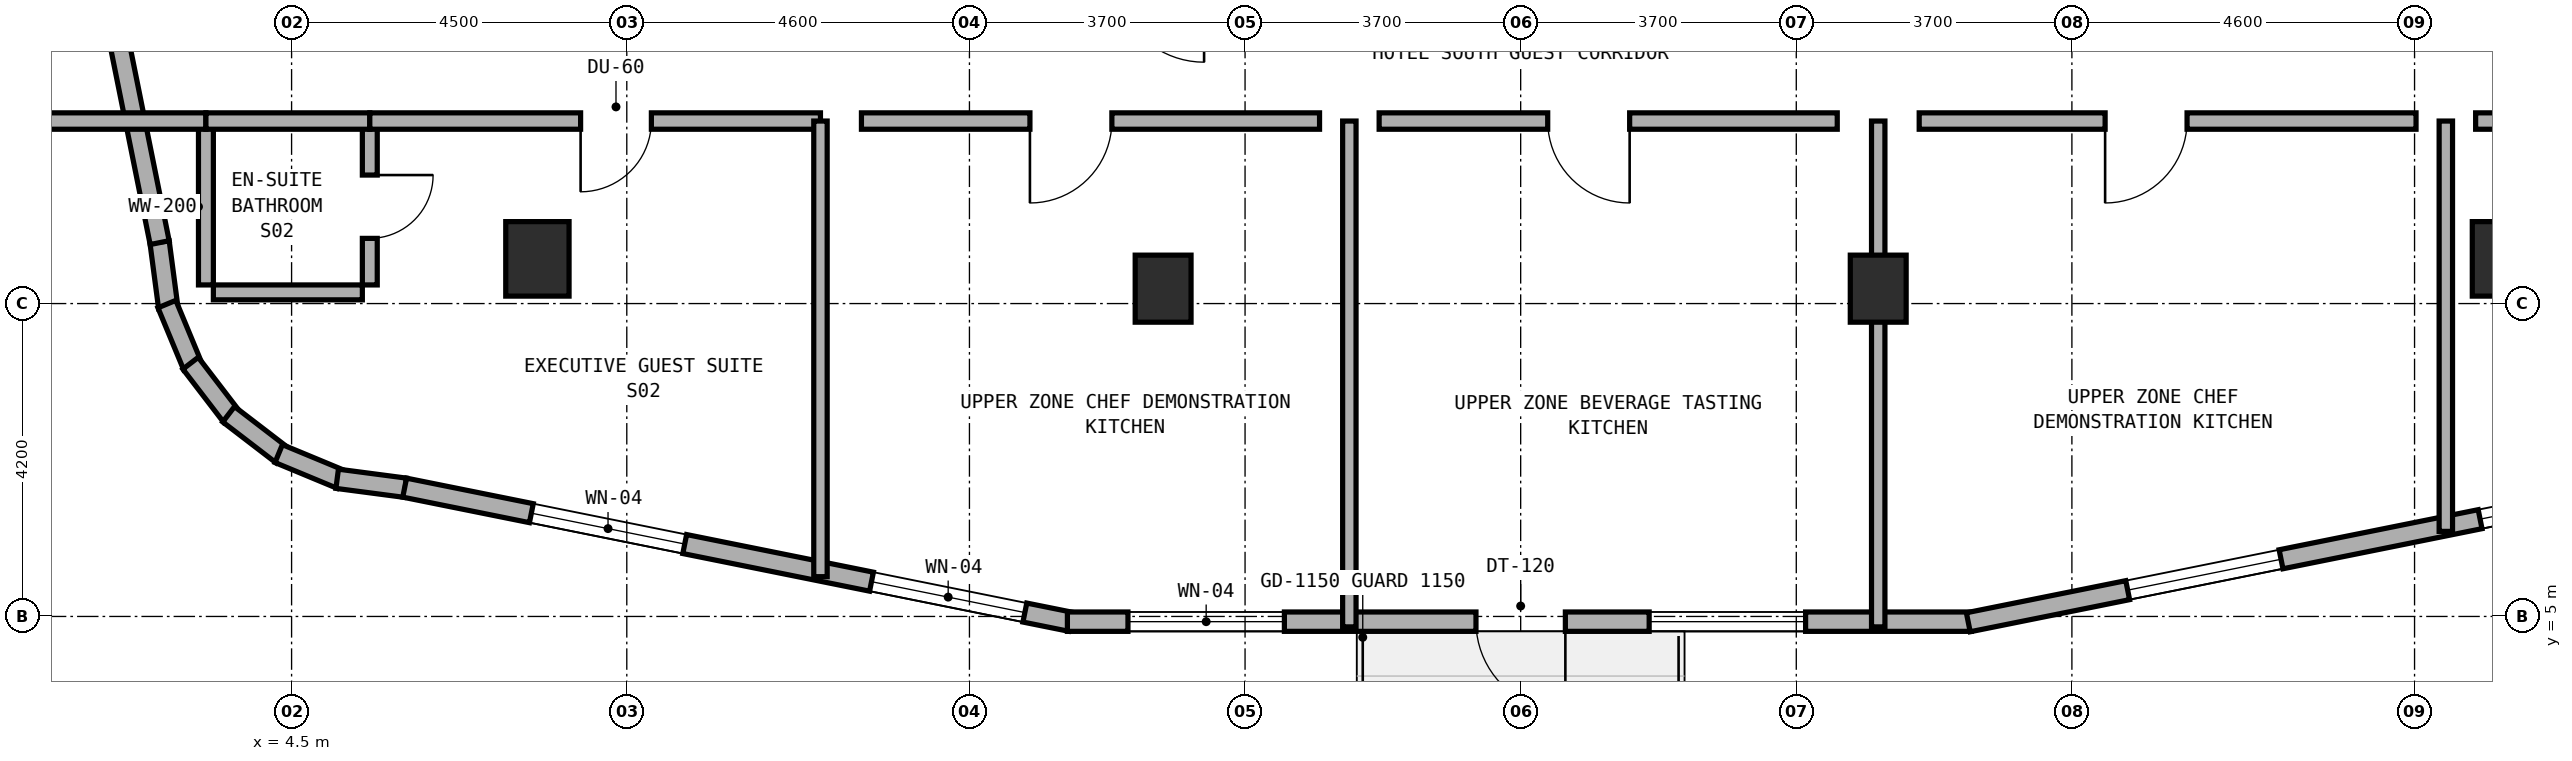
"""IFC4 building model, lengths in metres.
Left out: names, types, materials, properties, quantities, classifications, styles, units other than length and angle.
Written with IfcOpenShell. Run it as: python <this file> out.ifc"""

import sys

from ifc_helpers import new_model, si_unit, direction, frame, frame_2d, origin, origin_2d, place, context, subcontext, project, spatial, rectangle, extrude, element, fill, save


model = new_model("IFC4")
c1 = context("Model", 3, precision=1e-05, world=origin(), true_north=direction((0.0, 1.0)))
c2 = subcontext(c1, "Body", "Model", "MODEL_VIEW")
j1 = project(units=[si_unit("LENGTHUNIT", "METRE"), si_unit("PLANEANGLEUNIT", "RADIAN")], contexts=[c1])
p1 = place(None, origin())
s1 = spatial("IfcSite", under=j1, at=p1, CompositionType="ELEMENT")
p2 = place(p1, origin())
s2 = spatial("IfcBuilding", under=s1, at=p2, CompositionType="ELEMENT")
p3 = place(p2, frame((0.0, 0.0, 166.0)))
s3 = spatial("IfcBuildingStorey", under=s2, at=p3, CompositionType="ELEMENT", Elevation=166.0)
for number, where, z_axis, x_axis in (
    (1, (16.2, 9.4, 0.0), (0.0, 0.0, 1.0), (1.0, 0.0, 0.0)),
    (2, (25.8, 9.4, 0.0), (0.0, 0.0, 1.0), (1.0, 0.0, 0.0)),
):
    element("IfcColumn", number, at=place(p3, frame(where, z_axis=z_axis, x_axis=x_axis)), inside=s3, PredefinedType="COLUMN", context=c2, shape_type="SweptSolid", body=[
        extrude(rectangle(XDim=0.75, YDim=0.9, at=origin_2d()), origin(), (0.0, 0.0, 1.0), 3.5),
    ])
for number, where, z_axis, x_axis in (
    (3, (7.8, 9.8, 0.0), (0.0, 0.0, 1.0), (1.0, 0.0, 0.0)),
    (4, (34.2, 9.8, 0.0), (0.0, 0.0, 1.0), (1.0, 0.0, 0.0)),
):
    element("IfcColumn", number, at=place(p3, frame(where, z_axis=z_axis, x_axis=x_axis)), inside=s3, PredefinedType="COLUMN", context=c2, shape_type="SweptSolid", body=[
        extrude(rectangle(XDim=0.85, YDim=1.0, at=origin_2d()), origin(), (0.0, 0.0, 1.0), 3.5),
    ])
p4 = place(p3, frame((2.728, 10.025, 0.0), z_axis=(0.0, 0.0, 1.0), x_axis=(0.130953706898, -0.991388484223, 0.0)))
e5 = element("IfcWall", 5, at=p4, inside=s3, PredefinedType="STANDARD", context=c2, shape_type="SweptSolid", body=[
    extrude(rectangle(XDim=0.885, YDim=0.26, at=frame_2d((0.443, 0.0))), origin(), (0.0, 0.0, 1.0), 3.22),
])
p5 = place(p3, frame((2.826, 9.193, 0.0), z_axis=(0.0, 0.0, 1.0), x_axis=(0.383290660547, -0.923627776508, 0.0)))
e6 = element("IfcWall", 6, at=p5, inside=s3, PredefinedType="STANDARD", context=c2, shape_type="SweptSolid", body=[
    extrude(rectangle(XDim=0.903, YDim=0.26, at=frame_2d((0.452, 0.0))), origin(), (0.0, 0.0, 1.0), 3.22),
])
p6 = place(p3, frame((3.144, 8.399, 0.0), z_axis=(0.0, 0.0, 1.0), x_axis=(0.608624690463, -0.793458244748, 0.0)))
e7 = element("IfcWall", 7, at=p6, inside=s3, PredefinedType="STANDARD", context=c2, shape_type="SweptSolid", body=[
    extrude(rectangle(XDim=0.902, YDim=0.26, at=frame_2d((0.451, 0.0))), origin(), (0.0, 0.0, 1.0), 3.22),
])
p7 = place(p3, frame((3.655, 7.714, 0.0), z_axis=(0.0, 0.0, 1.0), x_axis=(0.793558456666, -0.608494022858, 0.0)))
e8 = element("IfcWall", 8, at=p7, inside=s3, PredefinedType="STANDARD", context=c2, shape_type="SweptSolid", body=[
    extrude(rectangle(XDim=0.902, YDim=0.26, at=frame_2d((0.451, 0.0))), origin(), (0.0, 0.0, 1.0), 3.22),
])
p8 = place(p3, frame((4.327, 7.186, 0.0), z_axis=(0.0, 0.0, 1.0), x_axis=(0.923683767999, -0.383155708213, 0.0)))
e9 = element("IfcWall", 9, at=p8, inside=s3, PredefinedType="STANDARD", context=c2, shape_type="SweptSolid", body=[
    extrude(rectangle(XDim=0.903, YDim=0.26, at=frame_2d((0.451, 0.0))), origin(), (0.0, 0.0, 1.0), 3.22),
])
p9 = place(p3, frame((5.112, 6.848, 0.0), z_axis=(0.0, 0.0, 1.0), x_axis=(0.991487658083, -0.130200706103, 0.0)))
e10 = element("IfcWall", 10, at=p9, inside=s3, PredefinedType="STANDARD", context=c2, shape_type="SweptSolid", body=[
    extrude(rectangle(XDim=0.921, YDim=0.26, at=frame_2d((0.46, 0.0))), origin(), (0.0, 0.0, 1.0), 3.22),
])
p10 = place(p3, frame((6.018, 6.729, 0.0), z_axis=(0.0, 0.0, 1.0), x_axis=(0.980317172899, -0.197429077186, 0.0)))
e11 = element("IfcWall", 11, at=p10, inside=s3, PredefinedType="STANDARD", context=c2, shape_type="SweptSolid", body=[
    extrude(rectangle(XDim=9.117, YDim=0.26, at=frame_2d((4.559, 0.0))), origin(), (0.0, 0.0, 1.0), 3.22),
])
p11 = place(p10, frame((1.735, 0.0, 0.85)))
e12 = element("IfcOpeningElement", 12, at=p11, cuts=e11, PredefinedType="OPENING", context=c2, shape_type="SweptSolid", body=[
    extrude(rectangle(XDim=2.1, YDim=1.5, at=frame_2d((1.05, 0.75))), frame((0.0, 0.14, 0.0), z_axis=(0.0, -1.0, 0.0), x_axis=(1.0, 0.0, 0.0)), (0.0, 0.0, 1.0), 0.28),
])
p12 = place(p10, frame((6.393, 0.0, 0.85)))
e13 = element("IfcOpeningElement", 13, at=p12, cuts=e11, PredefinedType="OPENING", context=c2, shape_type="SweptSolid", body=[
    extrude(rectangle(XDim=2.1, YDim=1.5, at=frame_2d((1.05, 0.75))), frame((0.0, 0.14, 0.0), z_axis=(0.0, -1.0, 0.0), x_axis=(1.0, 0.0, 0.0)), (0.0, 0.0, 1.0), 0.28),
])
p13 = place(p3, frame((14.915, 4.93, 0.0), z_axis=(0.0, 0.0, 1.0), x_axis=(1.0, 0.0, 0.0)))
e14 = element("IfcWall", 14, at=p13, inside=s3, PredefinedType="STANDARD", context=c2, shape_type="SweptSolid", body=[
    extrude(rectangle(XDim=12.135, YDim=0.26, at=frame_2d((6.067, 0.0))), origin(), (0.0, 0.0, 1.0), 3.22),
])
p14 = place(p13, frame((5.485, 0.0, 0.0)))
e15 = element("IfcOpeningElement", 15, at=p14, cuts=e14, PredefinedType="OPENING", context=c2, shape_type="SweptSolid", body=[
    extrude(rectangle(XDim=1.2, YDim=2.15, at=frame_2d((0.6, 1.075))), frame((0.0, 0.14, 0.0), z_axis=(0.0, -1.0, 0.0), x_axis=(1.0, 0.0, 0.0)), (0.0, 0.0, 1.0), 0.28),
])
p15 = place(p13, frame((0.813, 0.0, 0.85)))
e16 = element("IfcOpeningElement", 16, at=p15, cuts=e14, PredefinedType="OPENING", context=c2, shape_type="SweptSolid", body=[
    extrude(rectangle(XDim=2.1, YDim=1.5, at=frame_2d((1.05, 0.75))), frame((0.0, 0.14, 0.0), z_axis=(0.0, -1.0, 0.0), x_axis=(1.0, 0.0, 0.0)), (0.0, 0.0, 1.0), 0.28),
])
p16 = place(p13, frame((7.81, 0.0, 0.85)))
e17 = element("IfcOpeningElement", 17, at=p16, cuts=e14, PredefinedType="OPENING", context=c2, shape_type="SweptSolid", body=[
    extrude(rectangle(XDim=2.1, YDim=1.5, at=frame_2d((1.05, 0.75))), frame((0.0, 0.14, 0.0), z_axis=(0.0, -1.0, 0.0), x_axis=(1.0, 0.0, 0.0)), (0.0, 0.0, 1.0), 0.28),
])
p17 = place(p3, frame((27.009, 4.922, 0.0), z_axis=(0.0, 0.0, 1.0), x_axis=(0.980321298532, 0.197408590603, 0.0)))
e18 = element("IfcWall", 18, at=p17, inside=s3, PredefinedType="STANDARD", context=c2, shape_type="SweptSolid", body=[
    extrude(rectangle(XDim=9.153, YDim=0.26, at=frame_2d((4.577, 0.0))), origin(), (0.0, 0.0, 1.0), 3.22),
])
p18 = place(p17, frame((2.183, 0.0, 0.85)))
e19 = element("IfcOpeningElement", 19, at=p18, cuts=e18, PredefinedType="OPENING", context=c2, shape_type="SweptSolid", body=[
    extrude(rectangle(XDim=2.1, YDim=1.5, at=frame_2d((1.05, 0.75))), frame((0.0, 0.14, 0.0), z_axis=(0.0, -1.0, 0.0), x_axis=(1.0, 0.0, 0.0)), (0.0, 0.0, 1.0), 0.28),
])
p19 = place(p17, frame((7.009, 0.0, 0.85)))
e20 = element("IfcOpeningElement", 20, at=p19, cuts=e18, PredefinedType="OPENING", context=c2, shape_type="SweptSolid", body=[
    extrude(rectangle(XDim=1.8, YDim=1.5, at=frame_2d((0.9, 0.75))), frame((0.0, 0.14, 0.0), z_axis=(0.0, -1.0, 0.0), x_axis=(1.0, 0.0, 0.0)), (0.0, 0.0, 1.0), 0.28),
])
p20 = place(p3, frame((0.916, 19.02, 0.0), z_axis=(0.0, 0.0, 1.0), x_axis=(0.197435082048, -0.980315963543, 0.0)))
e21 = element("IfcWall", 21, at=p20, inside=s3, PredefinedType="STANDARD", context=c2, shape_type="SweptSolid", body=[
    extrude(rectangle(XDim=9.183, YDim=0.26, at=frame_2d((4.591, 0.0))), origin(), (0.0, 0.0, 1.0), 3.22),
])
p21 = place(p20, frame((2.647, 0.0, 0.85)))
e22 = element("IfcOpeningElement", 22, at=p21, cuts=e21, PredefinedType="OPENING", context=c2, shape_type="SweptSolid", body=[
    extrude(rectangle(XDim=2.1, YDim=1.5, at=frame_2d((1.05, 0.75))), frame((0.0, 0.14, 0.0), z_axis=(0.0, -1.0, 0.0), x_axis=(1.0, 0.0, 0.0)), (0.0, 0.0, 1.0), 0.28),
])
p22 = place(p3, frame((5.55, 9.45, 0.0), z_axis=(0.0, 0.0, 1.0), x_axis=(0.0, 1.0, 0.0)))
e23 = element("IfcWall", 23, at=p22, inside=s3, PredefinedType="PLUMBINGWALL", context=c2, shape_type="SweptSolid", body=[
    extrude(rectangle(XDim=2.1, YDim=0.2, at=frame_2d((1.05, 0.0))), origin(), (0.0, 0.0, 1.0), 3.22),
])
p23 = place(p22, frame((0.625, 0.0, 0.0)))
e24 = element("IfcOpeningElement", 24, at=p23, cuts=e23, PredefinedType="OPENING", context=c2, shape_type="SweptSolid", body=[
    extrude(rectangle(XDim=0.85, YDim=2.1, at=frame_2d((0.425, 1.05))), frame((0.0, 0.11, 0.0), z_axis=(0.0, -1.0, 0.0), x_axis=(1.0, 0.0, 0.0)), (0.0, 0.0, 1.0), 0.22),
])
p24 = place(p3, frame((3.45, 9.35, 0.0), z_axis=(0.0, 0.0, 1.0), x_axis=(1.0, 0.0, 0.0)))
e25 = element("IfcWall", 25, at=p24, inside=s3, PredefinedType="PLUMBINGWALL", context=c2, shape_type="SweptSolid", body=[
    extrude(rectangle(XDim=2.0, YDim=0.2, at=frame_2d((1.0, 0.0))), origin(), (0.0, 0.0, 1.0), 3.22),
])
p25 = place(p3, frame((3.35, 9.45, 0.0), z_axis=(0.0, 0.0, 1.0), x_axis=(0.0, 1.0, 0.0)))
e26 = element("IfcWall", 26, at=p25, inside=s3, PredefinedType="PLUMBINGWALL", context=c2, shape_type="SweptSolid", body=[
    extrude(rectangle(XDim=2.1, YDim=0.2, at=frame_2d((1.05, 0.0))), origin(), (0.0, 0.0, 1.0), 3.22),
])
p26 = place(p3, frame((0.96, 11.65, 0.0), z_axis=(0.0, 0.0, 1.0), x_axis=(1.0, 0.0, 0.0)))
e27 = element("IfcWall", 27, at=p26, inside=s3, PredefinedType="SOLIDWALL", context=c2, shape_type="SweptSolid", body=[
    extrude(rectangle(XDim=2.39, YDim=0.22, at=frame_2d((1.195, 0.0))), origin(), (0.0, 0.0, 1.0), 3.22),
])
p27 = place(p3, frame((3.35, 11.65, 0.0), z_axis=(0.0, 0.0, 1.0), x_axis=(1.0, 0.0, 0.0)))
e28 = element("IfcWall", 28, at=p27, inside=s3, PredefinedType="SOLIDWALL", context=c2, shape_type="SweptSolid", body=[
    extrude(rectangle(XDim=2.2, YDim=0.22, at=frame_2d((1.1, 0.0))), origin(), (0.0, 0.0, 1.0), 3.22),
])
p28 = place(p3, frame((5.55, 11.65, 0.0), z_axis=(0.0, 0.0, 1.0), x_axis=(1.0, 0.0, 0.0)))
e29 = element("IfcWall", 29, at=p28, inside=s3, PredefinedType="SOLIDWALL", context=c2, shape_type="SweptSolid", body=[
    extrude(rectangle(XDim=6.05, YDim=0.22, at=frame_2d((3.025, 0.0))), origin(), (0.0, 0.0, 1.0), 2.795),
])
p29 = place(p28, frame((2.83, 0.0, 0.0)))
e30 = element("IfcOpeningElement", 30, at=p29, cuts=e29, PredefinedType="OPENING", context=c2, shape_type="SweptSolid", body=[
    extrude(rectangle(XDim=0.95, YDim=2.1, at=frame_2d((0.475, 1.05))), frame((0.0, 0.12, 0.0), z_axis=(0.0, -1.0, 0.0), x_axis=(1.0, 0.0, 0.0)), (0.0, 0.0, 1.0), 0.24),
])
p30 = place(p3, frame((11.6, 5.534, 0.0), z_axis=(0.0, 0.0, 1.0), x_axis=(0.0, 1.0, 0.0)))
e31 = element("IfcWall", 31, at=p30, inside=s3, PredefinedType="SOLIDWALL", context=c2, shape_type="SweptSolid", body=[
    extrude(rectangle(XDim=6.116, YDim=0.18, at=frame_2d((3.058, 0.0))), origin(), (0.0, 0.0, 1.0), 2.835),
])
p31 = place(p3, frame((18.7, 4.86, 0.0), z_axis=(0.0, 0.0, 1.0), x_axis=(0.0, 1.0, 0.0)))
e32 = element("IfcWall", 32, at=p31, inside=s3, PredefinedType="SOLIDWALL", context=c2, shape_type="SweptSolid", body=[
    extrude(rectangle(XDim=6.79, YDim=0.18, at=frame_2d((3.395, 0.0))), origin(), (0.0, 0.0, 1.0), 2.835),
])
p32 = place(p3, frame((12.15, 11.65, 0.0), z_axis=(0.0, 0.0, 1.0), x_axis=(1.0, 0.0, 0.0)))
e33 = element("IfcWall", 33, at=p32, inside=s3, PredefinedType="SOLIDWALL", context=c2, shape_type="SweptSolid", body=[
    extrude(rectangle(XDim=6.15, YDim=0.22, at=frame_2d((3.075, 0.0))), origin(), (0.0, 0.0, 1.0), 2.795),
])
p33 = place(p32, frame((2.262, 0.0, 0.0)))
e34 = element("IfcOpeningElement", 34, at=p33, cuts=e33, PredefinedType="OPENING", context=c2, shape_type="SweptSolid", body=[
    extrude(rectangle(XDim=1.1, YDim=2.1, at=frame_2d((0.55, 1.05))), frame((0.0, 0.12, 0.0), z_axis=(0.0, -1.0, 0.0), x_axis=(1.0, 0.0, 0.0)), (0.0, 0.0, 1.0), 0.24),
])
p34 = place(p3, frame((19.1, 11.65, 0.0), z_axis=(0.0, 0.0, 1.0), x_axis=(1.0, 0.0, 0.0)))
e35 = element("IfcWall", 35, at=p34, inside=s3, PredefinedType="SOLIDWALL", context=c2, shape_type="SweptSolid", body=[
    extrude(rectangle(XDim=6.15, YDim=0.22, at=frame_2d((3.075, 0.0))), origin(), (0.0, 0.0, 1.0), 3.22),
])
p35 = place(p34, frame((2.263, 0.0, 0.0)))
e36 = element("IfcOpeningElement", 36, at=p35, cuts=e35, PredefinedType="OPENING", context=c2, shape_type="SweptSolid", body=[
    extrude(rectangle(XDim=1.1, YDim=2.1, at=frame_2d((0.55, 1.05))), frame((0.0, 0.12, 0.0), z_axis=(0.0, -1.0, 0.0), x_axis=(1.0, 0.0, 0.0)), (0.0, 0.0, 1.0), 0.24),
])
p36 = place(p3, frame((25.8, 4.86, 0.0), z_axis=(0.0, 0.0, 1.0), x_axis=(0.0, 1.0, 0.0)))
e37 = element("IfcWall", 37, at=p36, inside=s3, PredefinedType="SOLIDWALL", context=c2, shape_type="SweptSolid", body=[
    extrude(rectangle(XDim=6.79, YDim=0.18, at=frame_2d((3.395, 0.0))), origin(), (0.0, 0.0, 1.0), 2.795),
])
p37 = place(p3, frame((33.42, 6.142, 0.0), z_axis=(0.0, 0.0, 1.0), x_axis=(0.0, 1.0, 0.0)))
e38 = element("IfcWall", 38, at=p37, inside=s3, PredefinedType="SOLIDWALL", context=c2, shape_type="SweptSolid", body=[
    extrude(rectangle(XDim=5.508, YDim=0.18, at=frame_2d((2.754, 0.0))), origin(), (0.0, 0.0, 1.0), 2.835),
])
p38 = place(p3, frame((26.35, 11.65, 0.0), z_axis=(0.0, 0.0, 1.0), x_axis=(1.0, 0.0, 0.0)))
e39 = element("IfcWall", 39, at=p38, inside=s3, PredefinedType="SOLIDWALL", context=c2, shape_type="SweptSolid", body=[
    extrude(rectangle(XDim=6.67, YDim=0.22, at=frame_2d((3.335, 0.0))), origin(), (0.0, 0.0, 1.0), 2.795),
])
p39 = place(p38, frame((2.496, 0.0, 0.0)))
e40 = element("IfcOpeningElement", 40, at=p39, cuts=e39, PredefinedType="OPENING", context=c2, shape_type="SweptSolid", body=[
    extrude(rectangle(XDim=1.1, YDim=2.1, at=frame_2d((0.55, 1.05))), frame((0.0, 0.12, 0.0), z_axis=(0.0, -1.0, 0.0), x_axis=(1.0, 0.0, 0.0)), (0.0, 0.0, 1.0), 0.24),
])
p40 = place(p3, frame((33.82, 11.65, 0.0), z_axis=(0.0, 0.0, 1.0), x_axis=(1.0, 0.0, 0.0)))
e41 = element("IfcWall", 41, at=p40, inside=s3, PredefinedType="SOLIDWALL", context=c2, shape_type="SweptSolid", body=[
    extrude(rectangle(XDim=6.67, YDim=0.22, at=frame_2d((3.335, 0.0))), origin(), (0.0, 0.0, 1.0), 2.795),
])
p41 = place(p40, frame((2.497, 0.0, 0.0)))
e42 = element("IfcOpeningElement", 42, at=p41, cuts=e41, PredefinedType="OPENING", context=c2, shape_type="SweptSolid", body=[
    extrude(rectangle(XDim=1.1, YDim=2.1, at=frame_2d((0.55, 1.05))), frame((0.0, 0.12, 0.0), z_axis=(0.0, -1.0, 0.0), x_axis=(1.0, 0.0, 0.0)), (0.0, 0.0, 1.0), 0.24),
])
p42 = place(p11, origin())
e43 = element("IfcWindow", 43, at=p42, inside=s3, PartitioningType="SINGLE_PANEL", PredefinedType="WINDOW", context=c2, shape_type="SweptSolid", body=[
    extrude(rectangle(XDim=2.1, YDim=1.5, at=frame_2d((1.05, 0.75))), frame((0.0, 0.03, 0.0), z_axis=(0.0, -1.0, 0.0), x_axis=(1.0, 0.0, 0.0)), (0.0, 0.0, 1.0), 0.06),
])
fill(e12, e43)
p43 = place(p12, origin())
e44 = element("IfcWindow", 44, at=p43, inside=s3, PartitioningType="SINGLE_PANEL", PredefinedType="WINDOW", context=c2, shape_type="SweptSolid", body=[
    extrude(rectangle(XDim=2.1, YDim=1.5, at=frame_2d((1.05, 0.75))), frame((0.0, 0.03, 0.0), z_axis=(0.0, -1.0, 0.0), x_axis=(1.0, 0.0, 0.0)), (0.0, 0.0, 1.0), 0.06),
])
fill(e13, e44)
p44 = place(p14, frame((1.2, 0.0, 0.0), z_axis=(0.0, 0.0, 1.0), x_axis=(-1.0, 0.0, 0.0)))
e45 = element("IfcDoor", 45, at=p44, inside=s3, OperationType="SINGLE_SWING_LEFT", PredefinedType="DOOR", context=c2, shape_type="SweptSolid", body=[
    extrude(rectangle(XDim=1.2, YDim=2.15, at=frame_2d((0.6, 1.075))), frame((0.0, 0.025, 0.0), z_axis=(0.0, -1.0, 0.0), x_axis=(1.0, 0.0, 0.0)), (0.0, 0.0, 1.0), 0.05),
])
fill(e15, e45)
p45 = place(p15, origin())
e46 = element("IfcWindow", 46, at=p45, inside=s3, PartitioningType="SINGLE_PANEL", PredefinedType="WINDOW", context=c2, shape_type="SweptSolid", body=[
    extrude(rectangle(XDim=2.1, YDim=1.5, at=frame_2d((1.05, 0.75))), frame((0.0, 0.03, 0.0), z_axis=(0.0, -1.0, 0.0), x_axis=(1.0, 0.0, 0.0)), (0.0, 0.0, 1.0), 0.06),
])
fill(e16, e46)
p46 = place(p16, origin())
e47 = element("IfcWindow", 47, at=p46, inside=s3, PartitioningType="SINGLE_PANEL", PredefinedType="WINDOW", context=c2, shape_type="SweptSolid", body=[
    extrude(rectangle(XDim=2.1, YDim=1.5, at=frame_2d((1.05, 0.75))), frame((0.0, 0.03, 0.0), z_axis=(0.0, -1.0, 0.0), x_axis=(1.0, 0.0, 0.0)), (0.0, 0.0, 1.0), 0.06),
])
fill(e17, e47)
p47 = place(p18, origin())
e48 = element("IfcWindow", 48, at=p47, inside=s3, PartitioningType="SINGLE_PANEL", PredefinedType="WINDOW", context=c2, shape_type="SweptSolid", body=[
    extrude(rectangle(XDim=2.1, YDim=1.5, at=frame_2d((1.05, 0.75))), frame((0.0, 0.03, 0.0), z_axis=(0.0, -1.0, 0.0), x_axis=(1.0, 0.0, 0.0)), (0.0, 0.0, 1.0), 0.06),
])
fill(e19, e48)
p48 = place(p19, origin())
e49 = element("IfcWindow", 49, at=p48, inside=s3, PartitioningType="SINGLE_PANEL", PredefinedType="WINDOW", context=c2, shape_type="SweptSolid", body=[
    extrude(rectangle(XDim=1.8, YDim=1.5, at=frame_2d((0.9, 0.75))), frame((0.0, 0.03, 0.0), z_axis=(0.0, -1.0, 0.0), x_axis=(1.0, 0.0, 0.0)), (0.0, 0.0, 1.0), 0.06),
])
fill(e20, e49)
p49 = place(p23, frame((0.85, 0.0, 0.0), z_axis=(0.0, 0.0, 1.0), x_axis=(-1.0, 0.0, 0.0)))
e50 = element("IfcDoor", 50, at=p49, inside=s3, OperationType="SINGLE_SWING_LEFT", PredefinedType="DOOR", context=c2, shape_type="SweptSolid", body=[
    extrude(rectangle(XDim=0.85, YDim=2.1, at=frame_2d((0.425, 1.05))), frame((0.0, 0.025, 0.0), z_axis=(0.0, -1.0, 0.0), x_axis=(1.0, 0.0, 0.0)), (0.0, 0.0, 1.0), 0.05),
])
fill(e24, e50)
p50 = place(p29, frame((0.95, 0.0, 0.0), z_axis=(0.0, 0.0, 1.0), x_axis=(-1.0, 0.0, 0.0)))
e51 = element("IfcDoor", 51, at=p50, inside=s3, OperationType="SINGLE_SWING_RIGHT", PredefinedType="DOOR", context=c2, shape_type="SweptSolid", body=[
    extrude(rectangle(XDim=0.95, YDim=2.1, at=frame_2d((0.475, 1.05))), frame((0.0, 0.025, 0.0), z_axis=(0.0, -1.0, 0.0), x_axis=(1.0, 0.0, 0.0)), (0.0, 0.0, 1.0), 0.05),
])
fill(e30, e51)
p51 = place(p33, frame((1.1, 0.0, 0.0), z_axis=(0.0, 0.0, 1.0), x_axis=(-1.0, 0.0, 0.0)))
e52 = element("IfcDoor", 52, at=p51, inside=s3, OperationType="SINGLE_SWING_RIGHT", PredefinedType="DOOR", context=c2, shape_type="SweptSolid", body=[
    extrude(rectangle(XDim=1.1, YDim=2.1, at=frame_2d((0.55, 1.05))), frame((0.0, 0.025, 0.0), z_axis=(0.0, -1.0, 0.0), x_axis=(1.0, 0.0, 0.0)), (0.0, 0.0, 1.0), 0.05),
])
fill(e34, e52)
p52 = place(p35, frame((1.1, 0.0, 0.0), z_axis=(0.0, 0.0, 1.0), x_axis=(-1.0, 0.0, 0.0)))
e53 = element("IfcDoor", 53, at=p52, inside=s3, OperationType="SINGLE_SWING_LEFT", PredefinedType="DOOR", context=c2, shape_type="SweptSolid", body=[
    extrude(rectangle(XDim=1.1, YDim=2.1, at=frame_2d((0.55, 1.05))), frame((0.0, 0.025, 0.0), z_axis=(0.0, -1.0, 0.0), x_axis=(1.0, 0.0, 0.0)), (0.0, 0.0, 1.0), 0.05),
])
fill(e36, e53)
p53 = place(p39, frame((1.1, 0.0, 0.0), z_axis=(0.0, 0.0, 1.0), x_axis=(-1.0, 0.0, 0.0)))
e54 = element("IfcDoor", 54, at=p53, inside=s3, OperationType="SINGLE_SWING_RIGHT", PredefinedType="DOOR", context=c2, shape_type="SweptSolid", body=[
    extrude(rectangle(XDim=1.1, YDim=2.1, at=frame_2d((0.55, 1.05))), frame((0.0, 0.025, 0.0), z_axis=(0.0, -1.0, 0.0), x_axis=(1.0, 0.0, 0.0)), (0.0, 0.0, 1.0), 0.05),
])
fill(e40, e54)
save(model, sys.argv[1])
